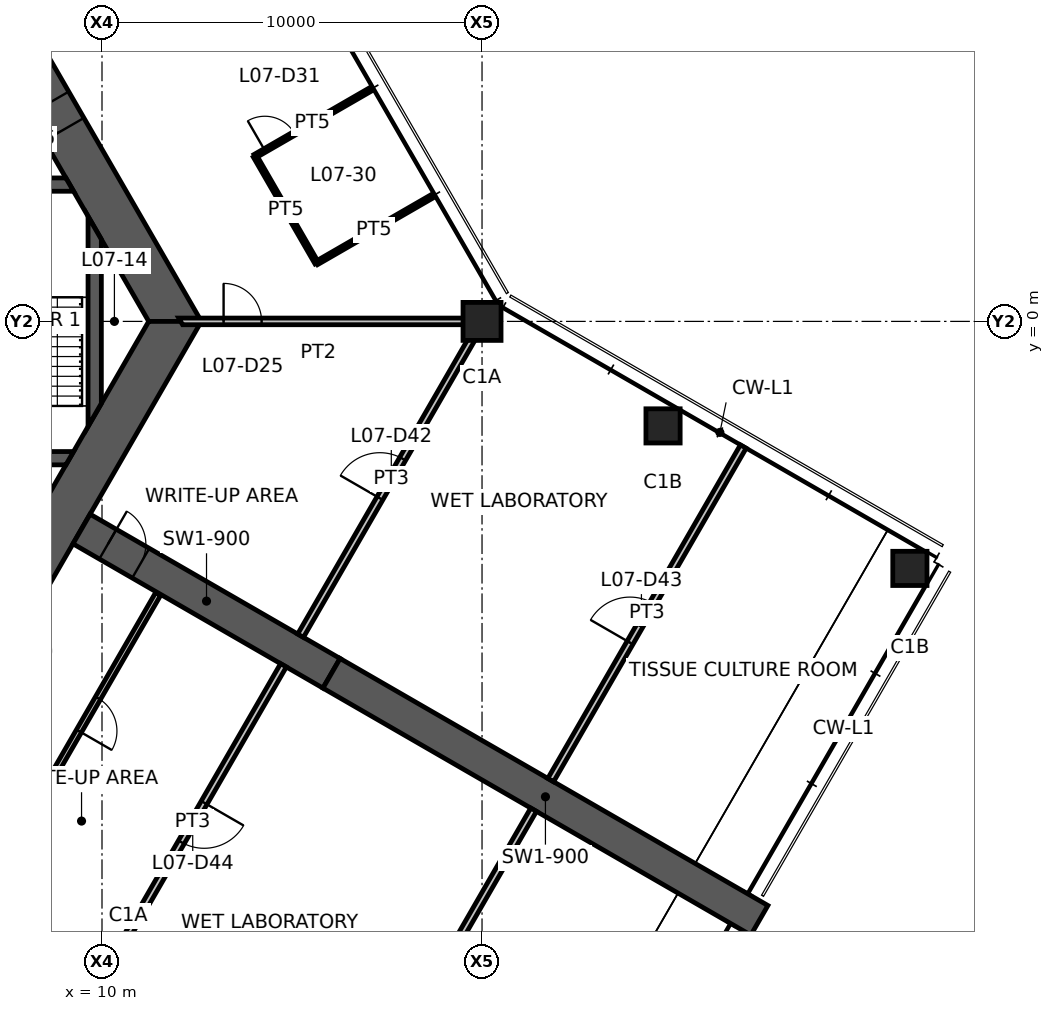
"""IFC4 building model, lengths in metres.
Left out: names, types, materials, properties, quantities, classifications, styles, units other than length and angle.
Written with IfcOpenShell. Run it as: python <this file> out.ifc"""

import sys

from ifc_helpers import new_model, si_unit, direction, frame, frame_2d, origin, origin_2d, place, context, subcontext, project, spatial, polyline, rectangle, hollow_rectangle, outline, extrude, element, fill, save


model = new_model("IFC4")
c1 = context("Model", 3, precision=1e-05, world=origin(), true_north=direction((0.0, 1.0)))
c2 = subcontext(c1, "Body", "Model", "MODEL_VIEW")
j1 = project(units=[si_unit("LENGTHUNIT", "METRE"), si_unit("PLANEANGLEUNIT", "RADIAN")], contexts=[c1])
p1 = place(None, origin())
s1 = spatial("IfcSite", under=j1, at=p1, CompositionType="ELEMENT")
p2 = place(p1, origin())
s2 = spatial("IfcBuilding", under=s1, at=p2, CompositionType="ELEMENT")
p3 = place(p2, frame((0.0, 0.0, 26.8)))
s3 = spatial("IfcBuildingStorey", under=s2, at=p3, CompositionType="ELEMENT", Elevation=26.8)
p4 = place(p3, frame((20.0, 0.0, 0.0), z_axis=(0.0, 0.0, 1.0), x_axis=(1.0, 0.0, 0.0)))
e1 = element("IfcColumn", 1, at=p4, inside=s3, PredefinedType="COLUMN", context=c2, shape_type="SweptSolid", body=[
    extrude(hollow_rectangle(XDim=1.0, YDim=1.0, WallThickness=0.06, at=origin_2d()), origin(), (0.0, 0.0, 1.0), 4.2),
])
for number, where, z_axis, x_axis in (
    (2, (24.763, -2.75, 0.0), (0.0, 0.0, 1.0), (1.0, 0.0, 0.0)),
    (3, (31.258, -6.5, 0.0), (0.0, 0.0, 1.0), (1.0, 0.0, 0.0)),
):
    element("IfcColumn", number, at=place(p3, frame(where, z_axis=z_axis, x_axis=x_axis)), inside=s3, PredefinedType="COLUMN", context=c2, shape_type="SweptSolid", body=[
        extrude(hollow_rectangle(XDim=0.9, YDim=0.9, WallThickness=0.05, at=origin_2d()), origin(), (0.0, 0.0, 1.0), 4.2),
    ])
p5 = place(p3, frame((11.922, 0.0, 0.0), z_axis=(0.0, 0.0, 1.0), x_axis=(-0.500004296715, 0.866022923061, 0.0)))
e4 = element("IfcWall", 4, at=p5, inside=s3, PredefinedType="SHEAR", context=c2, shape_type="SweptSolid", body=[
    extrude(outline(polyline([(-0.346, -0.6), (5.835, -0.6), (6.635, -0.6), (12.269, -0.6), (11.576, 0.6), (6.635, 0.6), (5.835, 0.6), (0.346, 0.6), (-0.346, -0.6)])), origin(), (0.0, 0.0, 1.0), 4.2),
])
p6 = place(p5, frame((5.835, 0.0, 0.0)))
e5 = element("IfcOpeningElement", 5, at=p6, cuts=e4, PredefinedType="OPENING", context=c2, shape_type="SweptSolid", body=[
    extrude(rectangle(XDim=0.8, YDim=2.1, at=frame_2d((0.4, 1.05))), frame((0.0, 0.61, 0.0), z_axis=(0.0, -1.0, 0.0), x_axis=(1.0, 0.0, 0.0)), (0.0, 0.0, 1.0), 1.22),
])
p7 = place(p3, frame((5.961, -10.325, 0.0), z_axis=(0.0, 0.0, 1.0), x_axis=(0.500004296715, 0.866022923061, 0.0)))
e6 = element("IfcWall", 6, at=p7, inside=s3, PredefinedType="SHEAR", context=c2, shape_type="SweptSolid", body=[
    extrude(outline(polyline([(-0.346, -0.6), (3.208, -0.6), (4.009, -0.6), (12.269, -0.6), (11.576, 0.6), (4.009, 0.6), (3.208, 0.6), (0.346, 0.6), (-0.346, -0.6)])), origin(), (0.0, 0.0, 1.0), 4.2),
])
p8 = place(p7, frame((3.208, 0.0, 0.0)))
e7 = element("IfcOpeningElement", 7, at=p8, cuts=e6, PredefinedType="OPENING", context=c2, shape_type="SweptSolid", body=[
    extrude(rectangle(XDim=0.8, YDim=2.1, at=frame_2d((0.4, 1.05))), frame((0.0, 0.61, 0.0), z_axis=(0.0, -1.0, 0.0), x_axis=(1.0, 0.0, 0.0)), (0.0, 0.0, 1.0), 1.22),
])
p9 = place(p3, frame((9.461, -5.462, 0.0), z_axis=(0.0, 0.0, 1.0), x_axis=(0.866019116917, -0.500010889016, 0.0)))
e8 = element("IfcWall", 8, at=p9, inside=s3, PredefinedType="SHEAR", context=c2, shape_type="SweptSolid", body=[
    extrude(rectangle(XDim=7.595, YDim=0.9, at=frame_2d((3.798, 0.0))), origin(), (0.0, 0.0, 1.0), 4.2),
])
p10 = place(p9, frame((0.8, 0.0, 0.0)))
e9 = element("IfcOpeningElement", 9, at=p10, cuts=e8, PredefinedType="OPENING", context=c2, shape_type="SweptSolid", body=[
    extrude(rectangle(XDim=1.0, YDim=2.1, at=frame_2d((0.5, 1.05))), frame((0.0, 0.46, 0.0), z_axis=(0.0, -1.0, 0.0), x_axis=(1.0, 0.0, 0.0)), (0.0, 0.0, 1.0), 0.92),
])
p11 = place(p3, frame((16.039, -9.26, 0.0), z_axis=(0.0, 0.0, 1.0), x_axis=(0.866024837091, -0.50000098154, 0.0)))
e10 = element("IfcWall", 10, at=p11, inside=s3, PredefinedType="SHEAR", context=c2, shape_type="SweptSolid", body=[
    extrude(rectangle(XDim=13.0, YDim=0.9, at=frame_2d((6.5, 0.0))), origin(), (0.0, 0.0, 1.0), 4.2),
])
p12 = place(p3, frame((1.425, 3.6, 0.0), z_axis=(0.0, 0.0, 1.0), x_axis=(1.0, 0.0, 0.0)))
e11 = element("IfcWall", 11, at=p12, inside=s3, PredefinedType="SHEAR", context=c2, shape_type="SweptSolid", body=[
    extrude(outline(polyline([(0.0, -0.175), (3.425, -0.175), (4.725, -0.175), (7.827, -0.175), (7.625, 0.175), (4.725, 0.175), (3.425, 0.175), (0.0, 0.175), (0.0, -0.175)])), origin(), (0.0, 0.0, 1.0), 4.2),
])
p13 = place(p12, frame((3.425, 0.0, 0.0)))
e12 = element("IfcOpeningElement", 12, at=p13, cuts=e11, PredefinedType="OPENING", context=c2, shape_type="SweptSolid", body=[
    extrude(rectangle(XDim=1.3, YDim=2.1, at=frame_2d((0.65, 1.05))), frame((0.0, 0.185, 0.0), z_axis=(0.0, -1.0, 0.0), x_axis=(1.0, 0.0, 0.0)), (0.0, 0.0, 1.0), 0.37),
])
p14 = place(p3, frame((1.425, -3.6, 0.0), z_axis=(0.0, 0.0, 1.0), x_axis=(1.0, 0.0, 0.0)))
e13 = element("IfcWall", 13, at=p14, inside=s3, PredefinedType="SHEAR", context=c2, shape_type="SweptSolid", body=[
    extrude(outline(polyline([(0.0, -0.175), (1.125, -0.175), (2.125, -0.175), (7.625, -0.175), (7.827, 0.175), (2.125, 0.175), (1.125, 0.175), (0.0, 0.175), (0.0, -0.175)])), origin(), (0.0, 0.0, 1.0), 4.2),
])
p15 = place(p14, frame((1.125, 0.0, 0.0)))
e14 = element("IfcOpeningElement", 14, at=p15, cuts=e13, PredefinedType="OPENING", context=c2, shape_type="SweptSolid", body=[
    extrude(rectangle(XDim=1.0, YDim=2.1, at=frame_2d((0.5, 1.05))), frame((0.0, 0.185, 0.0), z_axis=(0.0, -1.0, 0.0), x_axis=(1.0, 0.0, 0.0)), (0.0, 0.0, 1.0), 0.37),
])
p16 = place(p3, frame((9.808, -2.462, 0.0), z_axis=(0.0, 0.0, 1.0), x_axis=(0.0, 1.0, 0.0)))
e15 = element("IfcWall", 15, at=p16, inside=s3, PredefinedType="SHEAR", context=c2, shape_type="SweptSolid", body=[
    extrude(outline(polyline([(0.303, -0.175), (4.621, -0.175), (5.228, 0.175), (-0.303, 0.175), (0.303, -0.175)])), origin(), (0.0, 0.0, 1.0), 4.2),
])
p17 = place(p3, frame((12.07, 0.0, 0.0), z_axis=(0.0, 0.0, 1.0), x_axis=(1.0, 0.0, 0.0)))
e16 = element("IfcWall", 16, at=p17, inside=s3, PredefinedType="PARTITIONING", context=c2, shape_type="SweptSolid", body=[
    extrude(outline(polyline([(0.051, -0.087), (1.129, -0.087), (2.129, -0.087), (7.93, -0.087), (7.93, 0.087), (2.129, 0.087), (1.129, 0.087), (-0.051, 0.087), (0.051, -0.087)])), origin(), (0.0, 0.0, 1.0), 3.33),
])
p18 = place(p17, frame((1.129, 0.0, 0.0)))
e17 = element("IfcOpeningElement", 17, at=p18, cuts=e16, PredefinedType="OPENING", context=c2, shape_type="SweptSolid", body=[
    extrude(rectangle(XDim=1.0, YDim=2.1, at=frame_2d((0.5, 1.05))), frame((0.0, 0.098, 0.0), z_axis=(0.0, -1.0, 0.0), x_axis=(1.0, 0.0, 0.0)), (0.0, 0.0, 1.0), 0.195),
])
p19 = place(p3, frame((14.025, 4.349, 0.0), z_axis=(0.0, 0.0, 1.0), x_axis=(0.866043466982, 0.49996871232, 0.0)))
e18 = element("IfcWall", 18, at=p19, inside=s3, PredefinedType="PARTITIONING", context=c2, shape_type="SweptSolid", body=[
    extrude(rectangle(XDim=3.49, YDim=0.1, at=frame_2d((1.745, 0.0))), origin(), (0.0, 0.0, 1.0), 3.23),
])
p20 = place(p19, frame((0.3, 0.0, 0.0)))
e19 = element("IfcOpeningElement", 19, at=p20, cuts=e18, PredefinedType="OPENING", context=c2, shape_type="SweptSolid", body=[
    extrude(rectangle(XDim=0.9, YDim=2.1, at=frame_2d((0.45, 1.05))), frame((0.0, 0.06, 0.0), z_axis=(0.0, -1.0, 0.0), x_axis=(1.0, 0.0, 0.0)), (0.0, 0.0, 1.0), 0.12),
])
p21 = place(p3, frame((15.648, 1.537, 0.0), z_axis=(0.0, 0.0, 1.0), x_axis=(-0.499956811548, 0.866050337213, 0.0)))
e20 = element("IfcWall", 20, at=p21, inside=s3, PredefinedType="PARTITIONING", context=c2, shape_type="SweptSolid", body=[
    extrude(rectangle(XDim=3.246, YDim=0.1, at=frame_2d((1.623, 0.0))), origin(), (0.0, 0.0, 1.0), 3.23),
])
p22 = place(p3, frame((18.662, 3.277, 0.0), z_axis=(0.0, 0.0, 1.0), x_axis=(-0.866037222451, -0.499979528911, 0.0)))
e21 = element("IfcWall", 21, at=p22, inside=s3, PredefinedType="PARTITIONING", context=c2, shape_type="SweptSolid", body=[
    extrude(rectangle(XDim=3.48, YDim=0.1, at=frame_2d((1.74, 0.0))), origin(), (0.0, 0.0, 1.0), 3.23),
])
p23 = place(p3, frame((15.225, -8.271, 0.0), z_axis=(0.0, 0.0, 1.0), x_axis=(0.499993908199, 0.866028920859, 0.0)))
e22 = element("IfcWall", 22, at=p23, inside=s3, PredefinedType="PARTITIONING", context=c2, shape_type="SweptSolid", body=[
    extrude(rectangle(XDim=9.55, YDim=0.175, at=frame_2d((4.775, 0.0))), origin(), (0.0, 0.0, 1.0), 3.238),
])
p24 = place(p23, frame((4.175, 0.0, 0.0)))
e23 = element("IfcOpeningElement", 23, at=p24, cuts=e22, PredefinedType="OPENING", context=c2, shape_type="SweptSolid", body=[
    extrude(rectangle(XDim=1.2, YDim=2.1, at=frame_2d((0.6, 1.05))), frame((0.0, 0.098, 0.0), z_axis=(0.0, -1.0, 0.0), x_axis=(1.0, 0.0, 0.0)), (0.0, 0.0, 1.0), 0.195),
])
p25 = place(p3, frame((21.807, -12.071, 0.0), z_axis=(0.0, 0.0, 1.0), x_axis=(0.499994227129, 0.866028736727, 0.0)))
e24 = element("IfcWall", 24, at=p25, inside=s3, PredefinedType="PARTITIONING", context=c2, shape_type="SweptSolid", body=[
    extrude(rectangle(XDim=10.135, YDim=0.175, at=frame_2d((5.067, 0.0))), origin(), (0.0, 0.0, 1.0), 4.03),
])
p26 = place(p25, frame((4.175, 0.0, 0.0)))
e25 = element("IfcOpeningElement", 25, at=p26, cuts=e24, PredefinedType="OPENING", context=c2, shape_type="SweptSolid", body=[
    extrude(rectangle(XDim=1.2, YDim=2.1, at=frame_2d((0.6, 1.05))), frame((0.0, 0.098, 0.0), z_axis=(0.0, -1.0, 0.0), x_axis=(1.0, 0.0, 0.0)), (0.0, 0.0, 1.0), 0.195),
])
p27 = place(p3, frame((14.775, -9.05, 0.0), z_axis=(0.0, 0.0, 1.0), x_axis=(-0.499993908199, -0.866028920859, 0.0)))
e26 = element("IfcWall", 26, at=p27, inside=s3, PredefinedType="PARTITIONING", context=c2, shape_type="SweptSolid", body=[
    extrude(rectangle(XDim=9.55, YDim=0.175, at=frame_2d((4.775, 0.0))), origin(), (0.0, 0.0, 1.0), 3.238),
])
p28 = place(p27, frame((4.175, 0.0, 0.0)))
e27 = element("IfcOpeningElement", 27, at=p28, cuts=e26, PredefinedType="OPENING", context=c2, shape_type="SweptSolid", body=[
    extrude(rectangle(XDim=1.2, YDim=2.1, at=frame_2d((0.6, 1.05))), frame((0.0, 0.098, 0.0), z_axis=(0.0, -1.0, 0.0), x_axis=(1.0, 0.0, 0.0)), (0.0, 0.0, 1.0), 0.195),
])
p29 = place(p3, frame((11.478, -7.169, 0.0), z_axis=(0.0, 0.0, 1.0), x_axis=(-0.500010424145, -0.866019385318, 0.0)))
e28 = element("IfcWall", 28, at=p29, inside=s3, PredefinedType="PARTITIONING", context=c2, shape_type="SweptSolid", body=[
    extrude(rectangle(XDim=7.339, YDim=0.15, at=frame_2d((3.669, 0.0))), origin(), (0.0, 0.0, 1.0), 3.23),
])
p30 = place(p29, frame((3.169, 0.0, 0.0)))
e29 = element("IfcOpeningElement", 29, at=p30, cuts=e28, PredefinedType="OPENING", context=c2, shape_type="SweptSolid", body=[
    extrude(rectangle(XDim=1.0, YDim=2.1, at=frame_2d((0.5, 1.05))), frame((0.0, 0.085, 0.0), z_axis=(0.0, -1.0, 0.0), x_axis=(1.0, 0.0, 0.0)), (0.0, 0.0, 1.0), 0.17),
])
p31 = place(p3, frame((21.357, -12.85, 0.0), z_axis=(0.0, 0.0, 1.0), x_axis=(-0.499987145745, -0.866032825065, 0.0)))
e30 = element("IfcWall", 30, at=p31, inside=s3, PredefinedType="PARTITIONING", context=c2, shape_type="SweptSolid", body=[
    extrude(rectangle(XDim=10.14, YDim=0.175, at=frame_2d((5.07, 0.0))), origin(), (0.0, 0.0, 1.0), 4.03),
])
p32 = place(p31, frame((4.175, 0.0, 0.0)))
e31 = element("IfcOpeningElement", 31, at=p32, cuts=e30, PredefinedType="OPENING", context=c2, shape_type="SweptSolid", body=[
    extrude(rectangle(XDim=1.2, YDim=2.1, at=frame_2d((0.6, 1.05))), frame((0.0, 0.098, 0.0), z_axis=(0.0, -1.0, 0.0), x_axis=(1.0, 0.0, 0.0)), (0.0, 0.0, 1.0), 0.195),
])
p33 = place(p6, origin())
e32 = element("IfcDoor", 32, at=p33, inside=s3, OperationType="SINGLE_SWING_RIGHT", PredefinedType="DOOR", context=c2, shape_type="SweptSolid", body=[
    extrude(rectangle(XDim=0.8, YDim=2.1, at=frame_2d((0.4, 1.05))), frame((0.0, 0.025, 0.0), z_axis=(0.0, -1.0, 0.0), x_axis=(1.0, 0.0, 0.0)), (0.0, 0.0, 1.0), 0.05),
])
fill(e5, e32)
p34 = place(p10, origin())
e33 = element("IfcDoor", 33, at=p34, inside=s3, OperationType="SINGLE_SWING_LEFT", PredefinedType="DOOR", context=c2, shape_type="SweptSolid", body=[
    extrude(rectangle(XDim=1.0, YDim=2.1, at=frame_2d((0.5, 1.05))), frame((0.0, 0.025, 0.0), z_axis=(0.0, -1.0, 0.0), x_axis=(1.0, 0.0, 0.0)), (0.0, 0.0, 1.0), 0.05),
])
fill(e9, e33)
p35 = place(p18, origin())
e34 = element("IfcDoor", 34, at=p35, inside=s3, OperationType="SINGLE_SWING_LEFT", PredefinedType="DOOR", context=c2, shape_type="SweptSolid", body=[
    extrude(rectangle(XDim=1.0, YDim=2.1, at=frame_2d((0.5, 1.05))), frame((0.0, 0.025, 0.0), z_axis=(0.0, -1.0, 0.0), x_axis=(1.0, 0.0, 0.0)), (0.0, 0.0, 1.0), 0.05),
])
fill(e17, e34)
p36 = place(p20, origin())
e35 = element("IfcDoor", 35, at=p36, inside=s3, OperationType="SINGLE_SWING_LEFT", PredefinedType="DOOR", context=c2, shape_type="SweptSolid", body=[
    extrude(rectangle(XDim=0.9, YDim=2.1, at=frame_2d((0.45, 1.05))), frame((0.0, 0.025, 0.0), z_axis=(0.0, -1.0, 0.0), x_axis=(1.0, 0.0, 0.0)), (0.0, 0.0, 1.0), 0.05),
])
fill(e19, e35)
p37 = place(p24, origin())
e36 = element("IfcDoor", 36, at=p37, inside=s3, OperationType="DOUBLE_DOOR_SINGLE_SWING", PredefinedType="DOOR", context=c2, shape_type="SweptSolid", body=[
    extrude(rectangle(XDim=1.2, YDim=2.1, at=frame_2d((0.6, 1.05))), frame((0.0, 0.025, 0.0), z_axis=(0.0, -1.0, 0.0), x_axis=(1.0, 0.0, 0.0)), (0.0, 0.0, 1.0), 0.05),
])
fill(e23, e36)
p38 = place(p26, origin())
e37 = element("IfcDoor", 37, at=p38, inside=s3, OperationType="DOUBLE_DOOR_SINGLE_SWING", PredefinedType="DOOR", context=c2, shape_type="SweptSolid", body=[
    extrude(rectangle(XDim=1.2, YDim=2.1, at=frame_2d((0.6, 1.05))), frame((0.0, 0.025, 0.0), z_axis=(0.0, -1.0, 0.0), x_axis=(1.0, 0.0, 0.0)), (0.0, 0.0, 1.0), 0.05),
])
fill(e25, e37)
p39 = place(p28, origin())
e38 = element("IfcDoor", 38, at=p39, inside=s3, OperationType="DOUBLE_DOOR_SINGLE_SWING", PredefinedType="DOOR", context=c2, shape_type="SweptSolid", body=[
    extrude(rectangle(XDim=1.2, YDim=2.1, at=frame_2d((0.6, 1.05))), frame((0.0, 0.025, 0.0), z_axis=(0.0, -1.0, 0.0), x_axis=(1.0, 0.0, 0.0)), (0.0, 0.0, 1.0), 0.05),
])
fill(e27, e38)
p40 = place(p30, origin())
e39 = element("IfcDoor", 39, at=p40, inside=s3, OperationType="SINGLE_SWING_RIGHT", PredefinedType="DOOR", context=c2, shape_type="SweptSolid", body=[
    extrude(rectangle(XDim=1.0, YDim=2.1, at=frame_2d((0.5, 1.05))), frame((0.0, 0.025, 0.0), z_axis=(0.0, -1.0, 0.0), x_axis=(1.0, 0.0, 0.0)), (0.0, 0.0, 1.0), 0.05),
])
fill(e29, e39)
save(model, sys.argv[1])
